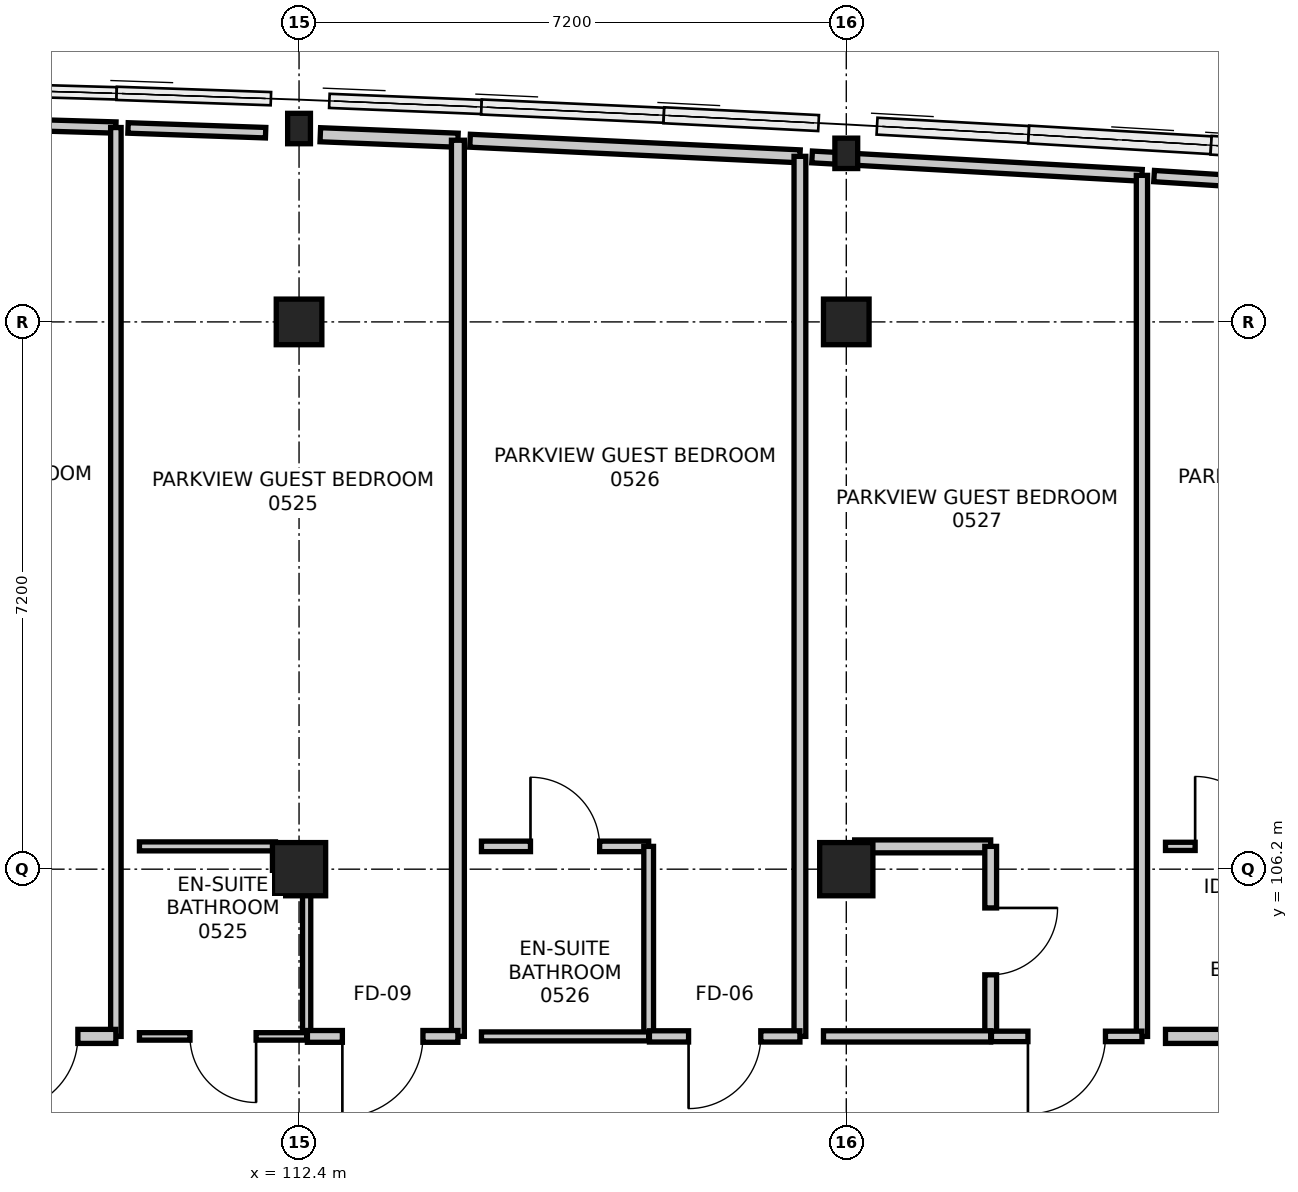
"""IFC4 building model, lengths in metres.
Left out: names, types, materials, properties, quantities, classifications, styles, units other than length and angle.
Written with IfcOpenShell. Run it as: python <this file> out.ifc"""

import sys

from ifc_helpers import new_model, si_unit, direction, frame, frame_2d, origin, origin_2d, place, context, subcontext, project, spatial, rectangle, i_section, extrude, element, fill, save


model = new_model("IFC4")
c1 = context("Model", 3, precision=1e-05, world=origin(), true_north=direction((0.0, 1.0)))
c2 = subcontext(c1, "Body", "Model", "MODEL_VIEW")
j1 = project(units=[si_unit("LENGTHUNIT", "METRE"), si_unit("PLANEANGLEUNIT", "RADIAN")], contexts=[c1])
p1 = place(None, origin())
s1 = spatial("IfcSite", under=j1, at=p1, CompositionType="ELEMENT")
p2 = place(p1, origin())
s2 = spatial("IfcBuilding", under=s1, at=p2, CompositionType="ELEMENT")
p3 = place(p2, frame((0.0, 0.0, 22.8)))
s3 = spatial("IfcBuildingStorey", under=s2, at=p3, CompositionType="ELEMENT", Elevation=22.8)
p4 = place(p3, frame((112.4, 106.2, 0.0), z_axis=(0.0, 0.0, 1.0), x_axis=(1.0, 0.0, 0.0)))
e1 = element("IfcColumn", 1, at=p4, inside=s3, PredefinedType="COLUMN", context=c2, shape_type="SweptSolid", body=[
    extrude(rectangle(XDim=0.7, YDim=0.7, at=origin_2d()), origin(), (0.0, 0.0, 1.0), 3.6),
])
p5 = place(p3, frame((112.4, 113.4, 0.0), z_axis=(0.0, 0.0, 1.0), x_axis=(1.0, 0.0, 0.0)))
e2 = element("IfcColumn", 2, at=p5, inside=s3, PredefinedType="COLUMN", context=c2, shape_type="SweptSolid", body=[
    extrude(rectangle(XDim=0.6, YDim=0.6, at=origin_2d()), origin(), (0.0, 0.0, 1.0), 3.6),
])
p6 = place(p3, frame((112.4, 115.944, 0.0), z_axis=(0.0, 0.0, 1.0), x_axis=(1.0, 0.0, 0.0)))
e3 = element("IfcColumn", 3, at=p6, inside=s3, PredefinedType="COLUMN", context=c2, shape_type="SweptSolid", body=[
    extrude(i_section(OverallWidth=0.3, OverallDepth=0.4, WebThickness=0.013, FlangeThickness=0.024, FilletRadius=0.027, at=origin_2d()), origin(), (0.0, 0.0, 1.0), 3.6),
])
p7 = place(p3, frame((119.6, 106.2, 0.0), z_axis=(0.0, 0.0, 1.0), x_axis=(1.0, 0.0, 0.0)))
e4 = element("IfcColumn", 4, at=p7, inside=s3, PredefinedType="COLUMN", context=c2, shape_type="SweptSolid", body=[
    extrude(rectangle(XDim=0.7, YDim=0.7, at=origin_2d()), origin(), (0.0, 0.0, 1.0), 3.6),
])
p8 = place(p3, frame((119.6, 113.4, 0.0), z_axis=(0.0, 0.0, 1.0), x_axis=(1.0, 0.0, 0.0)))
e5 = element("IfcColumn", 5, at=p8, inside=s3, PredefinedType="COLUMN", context=c2, shape_type="SweptSolid", body=[
    extrude(rectangle(XDim=0.6, YDim=0.6, at=origin_2d()), origin(), (0.0, 0.0, 1.0), 3.6),
])
p9 = place(p3, frame((119.6, 115.618, 0.0), z_axis=(0.0, 0.0, 1.0), x_axis=(1.0, 0.0, 0.0)))
e6 = element("IfcColumn", 6, at=p9, inside=s3, PredefinedType="COLUMN", context=c2, shape_type="SweptSolid", body=[
    extrude(i_section(OverallWidth=0.3, OverallDepth=0.4, WebThickness=0.013, FlangeThickness=0.024, FilletRadius=0.027, at=origin_2d()), origin(), (0.0, 0.0, 1.0), 3.6),
])
p10 = place(p3, frame((107.82, 116.019, 0.0), z_axis=(0.0, 0.0, 1.0), x_axis=(0.999591902973, -0.028566195247, 0.0)))
e7 = element("IfcWall", 7, at=p10, inside=s3, PredefinedType="PARTITIONING", context=c2, shape_type="SweptSolid", body=[
    extrude(rectangle(XDim=2.171, YDim=0.148, at=frame_2d((1.085, 0.0))), origin(), (0.0, 0.0, 1.0), 2.926),
])
p11 = place(p3, frame((109.99, 115.957, 0.0), z_axis=(0.0, 0.0, 1.0), x_axis=(0.0, -1.0, 0.0)))
e8 = element("IfcWall", 8, at=p11, inside=s3, PredefinedType="PARTITIONING", context=c2, shape_type="SweptSolid", body=[
    extrude(rectangle(XDim=11.957, YDim=0.138, at=frame_2d((5.979, 0.0))), origin(), (0.0, 0.0, 1.0), 2.735),
])
p12 = place(p3, frame((109.99, 104.0, 0.0), z_axis=(0.0, 0.0, 1.0), x_axis=(-1.0, 0.0, 0.0)))
e9 = element("IfcWall", 9, at=p12, inside=s3, PredefinedType="PARTITIONING", context=c2, shape_type="SweptSolid", body=[
    extrude(rectangle(XDim=1.98, YDim=0.185, at=frame_2d((0.99, 0.0))), origin(), (0.0, 0.0, 1.0), 3.35),
])
p13 = place(p12, frame((0.5, 0.0, 0.0)))
e10 = element("IfcOpeningElement", 10, at=p13, cuts=e9, PredefinedType="OPENING", context=c2, shape_type="SweptSolid", body=[
    extrude(rectangle(XDim=0.98, YDim=2.15, at=frame_2d((0.49, 1.075))), frame((0.0, 0.103, 0.0), z_axis=(0.0, -1.0, 0.0), x_axis=(1.0, 0.0, 0.0)), (0.0, 0.0, 1.0), 0.205),
])
p14 = place(p3, frame((110.3, 106.5, 0.0), z_axis=(0.0, 0.0, 1.0), x_axis=(1.0, 0.0, 0.0)))
e11 = element("IfcWall", 11, at=p14, inside=s3, PredefinedType="PARTITIONING", context=c2, shape_type="SweptSolid", body=[
    extrude(rectangle(XDim=1.79, YDim=0.118, at=frame_2d((0.895, 0.0))), origin(), (0.0, 0.0, 1.0), 3.35),
])
p15 = place(p3, frame((112.5, 106.09, 0.0), z_axis=(0.0, 0.0, 1.0), x_axis=(0.0, -1.0, 0.0)))
e12 = element("IfcWall", 12, at=p15, inside=s3, PredefinedType="PARTITIONING", context=c2, shape_type="SweptSolid", body=[
    extrude(rectangle(XDim=2.09, YDim=0.108, at=frame_2d((1.045, 0.0))), origin(), (0.0, 0.0, 1.0), 2.685),
])
p16 = place(p3, frame((112.5, 104.0, 0.0), z_axis=(0.0, 0.0, 1.0), x_axis=(-1.0, 0.0, 0.0)))
e13 = element("IfcWall", 13, at=p16, inside=s3, PredefinedType="PARTITIONING", context=c2, shape_type="SweptSolid", body=[
    extrude(rectangle(XDim=2.2, YDim=0.098, at=frame_2d((1.1, 0.0))), origin(), (0.0, 0.0, 1.0), 2.685),
])
p17 = place(p16, frame((0.665, 0.0, 0.0)))
e14 = element("IfcOpeningElement", 14, at=p17, cuts=e13, PredefinedType="OPENING", context=c2, shape_type="SweptSolid", body=[
    extrude(rectangle(XDim=0.87, YDim=2.07, at=frame_2d((0.435, 1.035))), frame((0.0, 0.059, 0.0), z_axis=(0.0, -1.0, 0.0), x_axis=(1.0, 0.0, 0.0)), (0.0, 0.0, 1.0), 0.118),
])
p18 = place(p3, frame((110.15, 115.952, 0.0), z_axis=(0.0, 0.0, 1.0), x_axis=(0.999404557823, -0.034504054862, 0.0)))
e15 = element("IfcWall", 15, at=p18, inside=s3, PredefinedType="PARTITIONING", context=c2, shape_type="SweptSolid", body=[
    extrude(rectangle(XDim=1.811, YDim=0.138, at=frame_2d((0.906, 0.0))), origin(), (0.0, 0.0, 1.0), 2.926),
])
p19 = place(p3, frame((112.68, 115.862, 0.0), z_axis=(0.0, 0.0, 1.0), x_axis=(0.999204184401, -0.039887314711, 0.0)))
e16 = element("IfcWall", 16, at=p19, inside=s3, PredefinedType="PARTITIONING", context=c2, shape_type="SweptSolid", body=[
    extrude(rectangle(XDim=1.812, YDim=0.185, at=frame_2d((0.906, 0.0))), origin(), (0.0, 0.0, 1.0), 2.926),
])
p20 = place(p3, frame((114.49, 115.79, 0.0), z_axis=(0.0, 0.0, 1.0), x_axis=(0.0, -1.0, 0.0)))
e17 = element("IfcWall", 17, at=p20, inside=s3, PredefinedType="PARTITIONING", context=c2, shape_type="SweptSolid", body=[
    extrude(rectangle(XDim=11.79, YDim=0.17, at=frame_2d((5.895, 0.0))), origin(), (0.0, 0.0, 1.0), 2.735),
])
p21 = place(p3, frame((114.49, 104.0, 0.0), z_axis=(0.0, 0.0, 1.0), x_axis=(-1.0, 0.0, 0.0)))
e18 = element("IfcWall", 18, at=p21, inside=s3, PredefinedType="PARTITIONING", context=c2, shape_type="SweptSolid", body=[
    extrude(rectangle(XDim=1.98, YDim=0.155, at=frame_2d((0.99, 0.0))), origin(), (0.0, 0.0, 1.0), 2.685),
])
p22 = place(p21, frame((0.46, 0.0, 0.0)))
e19 = element("IfcOpeningElement", 19, at=p22, cuts=e18, PredefinedType="OPENING", context=c2, shape_type="SweptSolid", body=[
    extrude(rectangle(XDim=1.06, YDim=2.2, at=frame_2d((0.53, 1.1))), frame((0.0, 0.087, 0.0), z_axis=(0.0, -1.0, 0.0), x_axis=(1.0, 0.0, 0.0)), (0.0, 0.0, 1.0), 0.175),
])
p23 = place(p3, frame((114.8, 106.5, 0.0), z_axis=(0.0, 0.0, 1.0), x_axis=(1.0, 0.0, 0.0)))
e20 = element("IfcWall", 20, at=p23, inside=s3, PredefinedType="PARTITIONING", context=c2, shape_type="SweptSolid", body=[
    extrude(rectangle(XDim=2.2, YDim=0.138, at=frame_2d((1.1, 0.0))), origin(), (0.0, 0.0, 1.0), 3.35),
])
p24 = place(p23, frame((0.645, 0.0, 0.0)))
e21 = element("IfcOpeningElement", 21, at=p24, cuts=e20, PredefinedType="OPENING", context=c2, shape_type="SweptSolid", body=[
    extrude(rectangle(XDim=0.91, YDim=2.11, at=frame_2d((0.455, 1.055))), frame((0.0, 0.079, 0.0), z_axis=(0.0, -1.0, 0.0), x_axis=(1.0, 0.0, 0.0)), (0.0, 0.0, 1.0), 0.158),
])
p25 = place(p3, frame((117.0, 106.5, 0.0), z_axis=(0.0, 0.0, 1.0), x_axis=(0.0, -1.0, 0.0)))
e22 = element("IfcWall", 22, at=p25, inside=s3, PredefinedType="PARTITIONING", context=c2, shape_type="SweptSolid", body=[
    extrude(rectangle(XDim=2.5, YDim=0.128, at=frame_2d((1.25, 0.0))), origin(), (0.0, 0.0, 1.0), 2.735),
])
p26 = place(p3, frame((117.0, 104.0, 0.0), z_axis=(0.0, 0.0, 1.0), x_axis=(-1.0, 0.0, 0.0)))
e23 = element("IfcWall", 23, at=p26, inside=s3, PredefinedType="PARTITIONING", context=c2, shape_type="SweptSolid", body=[
    extrude(rectangle(XDim=2.2, YDim=0.118, at=frame_2d((1.1, 0.0))), origin(), (0.0, 0.0, 1.0), 3.35),
])
p27 = place(p3, frame((114.65, 115.784, 0.0), z_axis=(0.0, 0.0, 1.0), x_axis=(0.998882836316, -0.047255468602, 0.0)))
e24 = element("IfcWall", 24, at=p27, inside=s3, PredefinedType="PARTITIONING", context=c2, shape_type="SweptSolid", body=[
    extrude(rectangle(XDim=4.345, YDim=0.17, at=frame_2d((2.172, 0.0))), origin(), (0.0, 0.0, 1.0), 2.926),
])
p28 = place(p3, frame((118.99, 115.578, 0.0), z_axis=(0.0, 0.0, 1.0), x_axis=(0.0, -1.0, 0.0)))
e25 = element("IfcWall", 25, at=p28, inside=s3, PredefinedType="PARTITIONING", context=c2, shape_type="SweptSolid", body=[
    extrude(rectangle(XDim=11.578, YDim=0.155, at=frame_2d((5.789, 0.0))), origin(), (0.0, 0.0, 1.0), 2.735),
])
p29 = place(p3, frame((118.99, 104.0, 0.0), z_axis=(0.0, 0.0, 1.0), x_axis=(-1.0, 0.0, 0.0)))
e26 = element("IfcWall", 26, at=p29, inside=s3, PredefinedType="PARTITIONING", context=c2, shape_type="SweptSolid", body=[
    extrude(rectangle(XDim=1.98, YDim=0.148, at=frame_2d((0.99, 0.0))), origin(), (0.0, 0.0, 1.0), 3.35),
])
p30 = place(p29, frame((0.515, 0.0, 0.0)))
e27 = element("IfcOpeningElement", 27, at=p30, cuts=e26, PredefinedType="OPENING", context=c2, shape_type="SweptSolid", body=[
    extrude(rectangle(XDim=0.95, YDim=2.1, at=frame_2d((0.475, 1.05))), frame((0.0, 0.084, 0.0), z_axis=(0.0, -1.0, 0.0), x_axis=(1.0, 0.0, 0.0)), (0.0, 0.0, 1.0), 0.168),
])
p31 = place(p3, frame((119.71, 106.5, 0.0), z_axis=(0.0, 0.0, 1.0), x_axis=(1.0, 0.0, 0.0)))
e28 = element("IfcWall", 28, at=p31, inside=s3, PredefinedType="PARTITIONING", context=c2, shape_type="SweptSolid", body=[
    extrude(rectangle(XDim=1.79, YDim=0.17, at=frame_2d((0.895, 0.0))), origin(), (0.0, 0.0, 1.0), 2.685),
])
p32 = place(p3, frame((121.5, 106.5, 0.0), z_axis=(0.0, 0.0, 1.0), x_axis=(0.0, -1.0, 0.0)))
e29 = element("IfcWall", 29, at=p32, inside=s3, PredefinedType="PARTITIONING", context=c2, shape_type="SweptSolid", body=[
    extrude(rectangle(XDim=2.5, YDim=0.155, at=frame_2d((1.25, 0.0))), origin(), (0.0, 0.0, 1.0), 2.735),
])
p33 = place(p32, frame((0.81, 0.0, 0.0)))
e30 = element("IfcOpeningElement", 30, at=p33, cuts=e29, PredefinedType="OPENING", context=c2, shape_type="SweptSolid", body=[
    extrude(rectangle(XDim=0.88, YDim=2.06, at=frame_2d((0.44, 1.03))), frame((0.0, 0.087, 0.0), z_axis=(0.0, -1.0, 0.0), x_axis=(1.0, 0.0, 0.0)), (0.0, 0.0, 1.0), 0.175),
])
p34 = place(p3, frame((121.5, 104.0, 0.0), z_axis=(0.0, 0.0, 1.0), x_axis=(-1.0, 0.0, 0.0)))
e31 = element("IfcWall", 31, at=p34, inside=s3, PredefinedType="PARTITIONING", context=c2, shape_type="SweptSolid", body=[
    extrude(rectangle(XDim=2.2, YDim=0.148, at=frame_2d((1.1, 0.0))), origin(), (0.0, 0.0, 1.0), 2.685),
])
p35 = place(p3, frame((119.15, 115.57, 0.0), z_axis=(0.0, 0.0, 1.0), x_axis=(0.998443544549, -0.055771752249, 0.0)))
e32 = element("IfcWall", 32, at=p35, inside=s3, PredefinedType="PARTITIONING", context=c2, shape_type="SweptSolid", body=[
    extrude(rectangle(XDim=4.347, YDim=0.155, at=frame_2d((2.173, 0.0))), origin(), (0.0, 0.0, 1.0), 2.926),
])
p36 = place(p3, frame((123.49, 115.328, 0.0), z_axis=(0.0, 0.0, 1.0), x_axis=(0.0, -1.0, 0.0)))
e33 = element("IfcWall", 33, at=p36, inside=s3, PredefinedType="PARTITIONING", context=c2, shape_type="SweptSolid", body=[
    extrude(rectangle(XDim=11.328, YDim=0.148, at=frame_2d((5.664, 0.0))), origin(), (0.0, 0.0, 1.0), 2.735),
])
p37 = place(p3, frame((123.49, 104.0, 0.0), z_axis=(0.0, 0.0, 1.0), x_axis=(-1.0, 0.0, 0.0)))
e34 = element("IfcWall", 34, at=p37, inside=s3, PredefinedType="PARTITIONING", context=c2, shape_type="SweptSolid", body=[
    extrude(rectangle(XDim=1.98, YDim=0.138, at=frame_2d((0.99, 0.0))), origin(), (0.0, 0.0, 1.0), 3.35),
])
p38 = place(p37, frame((0.48, 0.0, 0.0)))
e35 = element("IfcOpeningElement", 35, at=p38, cuts=e34, PredefinedType="OPENING", context=c2, shape_type="SweptSolid", body=[
    extrude(rectangle(XDim=1.02, YDim=2.15, at=frame_2d((0.51, 1.075))), frame((0.0, 0.079, 0.0), z_axis=(0.0, -1.0, 0.0), x_axis=(1.0, 0.0, 0.0)), (0.0, 0.0, 1.0), 0.158),
])
p39 = place(p3, frame((123.8, 106.5, 0.0), z_axis=(0.0, 0.0, 1.0), x_axis=(1.0, 0.0, 0.0)))
e36 = element("IfcWall", 36, at=p39, inside=s3, PredefinedType="PARTITIONING", context=c2, shape_type="SweptSolid", body=[
    extrude(rectangle(XDim=2.2, YDim=0.108, at=frame_2d((1.1, 0.0))), origin(), (0.0, 0.0, 1.0), 3.35),
])
p40 = place(p39, frame((0.39, 0.0, 0.0)))
e37 = element("IfcOpeningElement", 37, at=p40, cuts=e36, PredefinedType="OPENING", context=c2, shape_type="SweptSolid", body=[
    extrude(rectangle(XDim=0.92, YDim=2.1, at=frame_2d((0.46, 1.05))), frame((0.0, 0.064, 0.0), z_axis=(0.0, -1.0, 0.0), x_axis=(1.0, 0.0, 0.0)), (0.0, 0.0, 1.0), 0.128),
])
p41 = place(p3, frame((126.0, 104.0, 0.0), z_axis=(0.0, 0.0, 1.0), x_axis=(-1.0, 0.0, 0.0)))
e38 = element("IfcWall", 38, at=p41, inside=s3, PredefinedType="PARTITIONING", context=c2, shape_type="SweptSolid", body=[
    extrude(rectangle(XDim=2.2, YDim=0.185, at=frame_2d((1.1, 0.0))), origin(), (0.0, 0.0, 1.0), 3.35),
])
p42 = place(p3, frame((123.65, 115.319, 0.0), z_axis=(0.0, 0.0, 1.0), x_axis=(0.998038791722, -0.062598484152, 0.0)))
e39 = element("IfcWall", 39, at=p42, inside=s3, PredefinedType="PARTITIONING", context=c2, shape_type="SweptSolid", body=[
    extrude(rectangle(XDim=4.349, YDim=0.148, at=frame_2d((2.174, 0.0))), origin(), (0.0, 0.0, 1.0), 2.926),
])
p43 = place(p13, origin())
e40 = element("IfcDoor", 40, at=p43, inside=s3, OperationType="SINGLE_SWING_RIGHT", PredefinedType="DOOR", context=c2, shape_type="SweptSolid", body=[
    extrude(rectangle(XDim=0.98, YDim=2.15, at=frame_2d((0.49, 1.075))), frame((0.0, 0.025, 0.0), z_axis=(0.0, -1.0, 0.0), x_axis=(1.0, 0.0, 0.0)), (0.0, 0.0, 1.0), 0.05),
])
fill(e10, e40)
p44 = place(p17, origin())
e41 = element("IfcDoor", 41, at=p44, inside=s3, OperationType="SINGLE_SWING_LEFT", PredefinedType="DOOR", context=c2, shape_type="SweptSolid", body=[
    extrude(rectangle(XDim=0.87, YDim=2.07, at=frame_2d((0.435, 1.035))), frame((0.0, 0.025, 0.0), z_axis=(0.0, -1.0, 0.0), x_axis=(1.0, 0.0, 0.0)), (0.0, 0.0, 1.0), 0.05),
])
fill(e14, e41)
p45 = place(p22, origin())
e42 = element("IfcDoor", 42, at=p45, inside=s3, OperationType="SINGLE_SWING_RIGHT", PredefinedType="DOOR", context=c2, shape_type="SweptSolid", body=[
    extrude(rectangle(XDim=1.06, YDim=2.2, at=frame_2d((0.53, 1.1))), frame((0.0, 0.025, 0.0), z_axis=(0.0, -1.0, 0.0), x_axis=(1.0, 0.0, 0.0)), (0.0, 0.0, 1.0), 0.05),
])
fill(e19, e42)
p46 = place(p24, origin())
e43 = element("IfcDoor", 43, at=p46, inside=s3, OperationType="SINGLE_SWING_LEFT", PredefinedType="DOOR", context=c2, shape_type="SweptSolid", body=[
    extrude(rectangle(XDim=0.91, YDim=2.11, at=frame_2d((0.455, 1.055))), frame((0.0, 0.025, 0.0), z_axis=(0.0, -1.0, 0.0), x_axis=(1.0, 0.0, 0.0)), (0.0, 0.0, 1.0), 0.05),
])
fill(e21, e43)
p47 = place(p30, origin())
e44 = element("IfcDoor", 44, at=p47, inside=s3, OperationType="SINGLE_SWING_RIGHT", PredefinedType="DOOR", context=c2, shape_type="SweptSolid", body=[
    extrude(rectangle(XDim=0.95, YDim=2.1, at=frame_2d((0.475, 1.05))), frame((0.0, 0.025, 0.0), z_axis=(0.0, -1.0, 0.0), x_axis=(1.0, 0.0, 0.0)), (0.0, 0.0, 1.0), 0.05),
])
fill(e27, e44)
p48 = place(p33, origin())
e45 = element("IfcDoor", 45, at=p48, inside=s3, OperationType="SINGLE_SWING_LEFT", PredefinedType="DOOR", context=c2, shape_type="SweptSolid", body=[
    extrude(rectangle(XDim=0.88, YDim=2.06, at=frame_2d((0.44, 1.03))), frame((0.0, 0.025, 0.0), z_axis=(0.0, -1.0, 0.0), x_axis=(1.0, 0.0, 0.0)), (0.0, 0.0, 1.0), 0.05),
])
fill(e30, e45)
p49 = place(p38, origin())
e46 = element("IfcDoor", 46, at=p49, inside=s3, OperationType="SINGLE_SWING_RIGHT", PredefinedType="DOOR", context=c2, shape_type="SweptSolid", body=[
    extrude(rectangle(XDim=1.02, YDim=2.15, at=frame_2d((0.51, 1.075))), frame((0.0, 0.025, 0.0), z_axis=(0.0, -1.0, 0.0), x_axis=(1.0, 0.0, 0.0)), (0.0, 0.0, 1.0), 0.05),
])
fill(e35, e46)
p50 = place(p40, origin())
e47 = element("IfcDoor", 47, at=p50, inside=s3, OperationType="SINGLE_SWING_LEFT", PredefinedType="DOOR", context=c2, shape_type="SweptSolid", body=[
    extrude(rectangle(XDim=0.92, YDim=2.1, at=frame_2d((0.46, 1.05))), frame((0.0, 0.025, 0.0), z_axis=(0.0, -1.0, 0.0), x_axis=(1.0, 0.0, 0.0)), (0.0, 0.0, 1.0), 0.05),
])
fill(e37, e47)
save(model, sys.argv[1])
